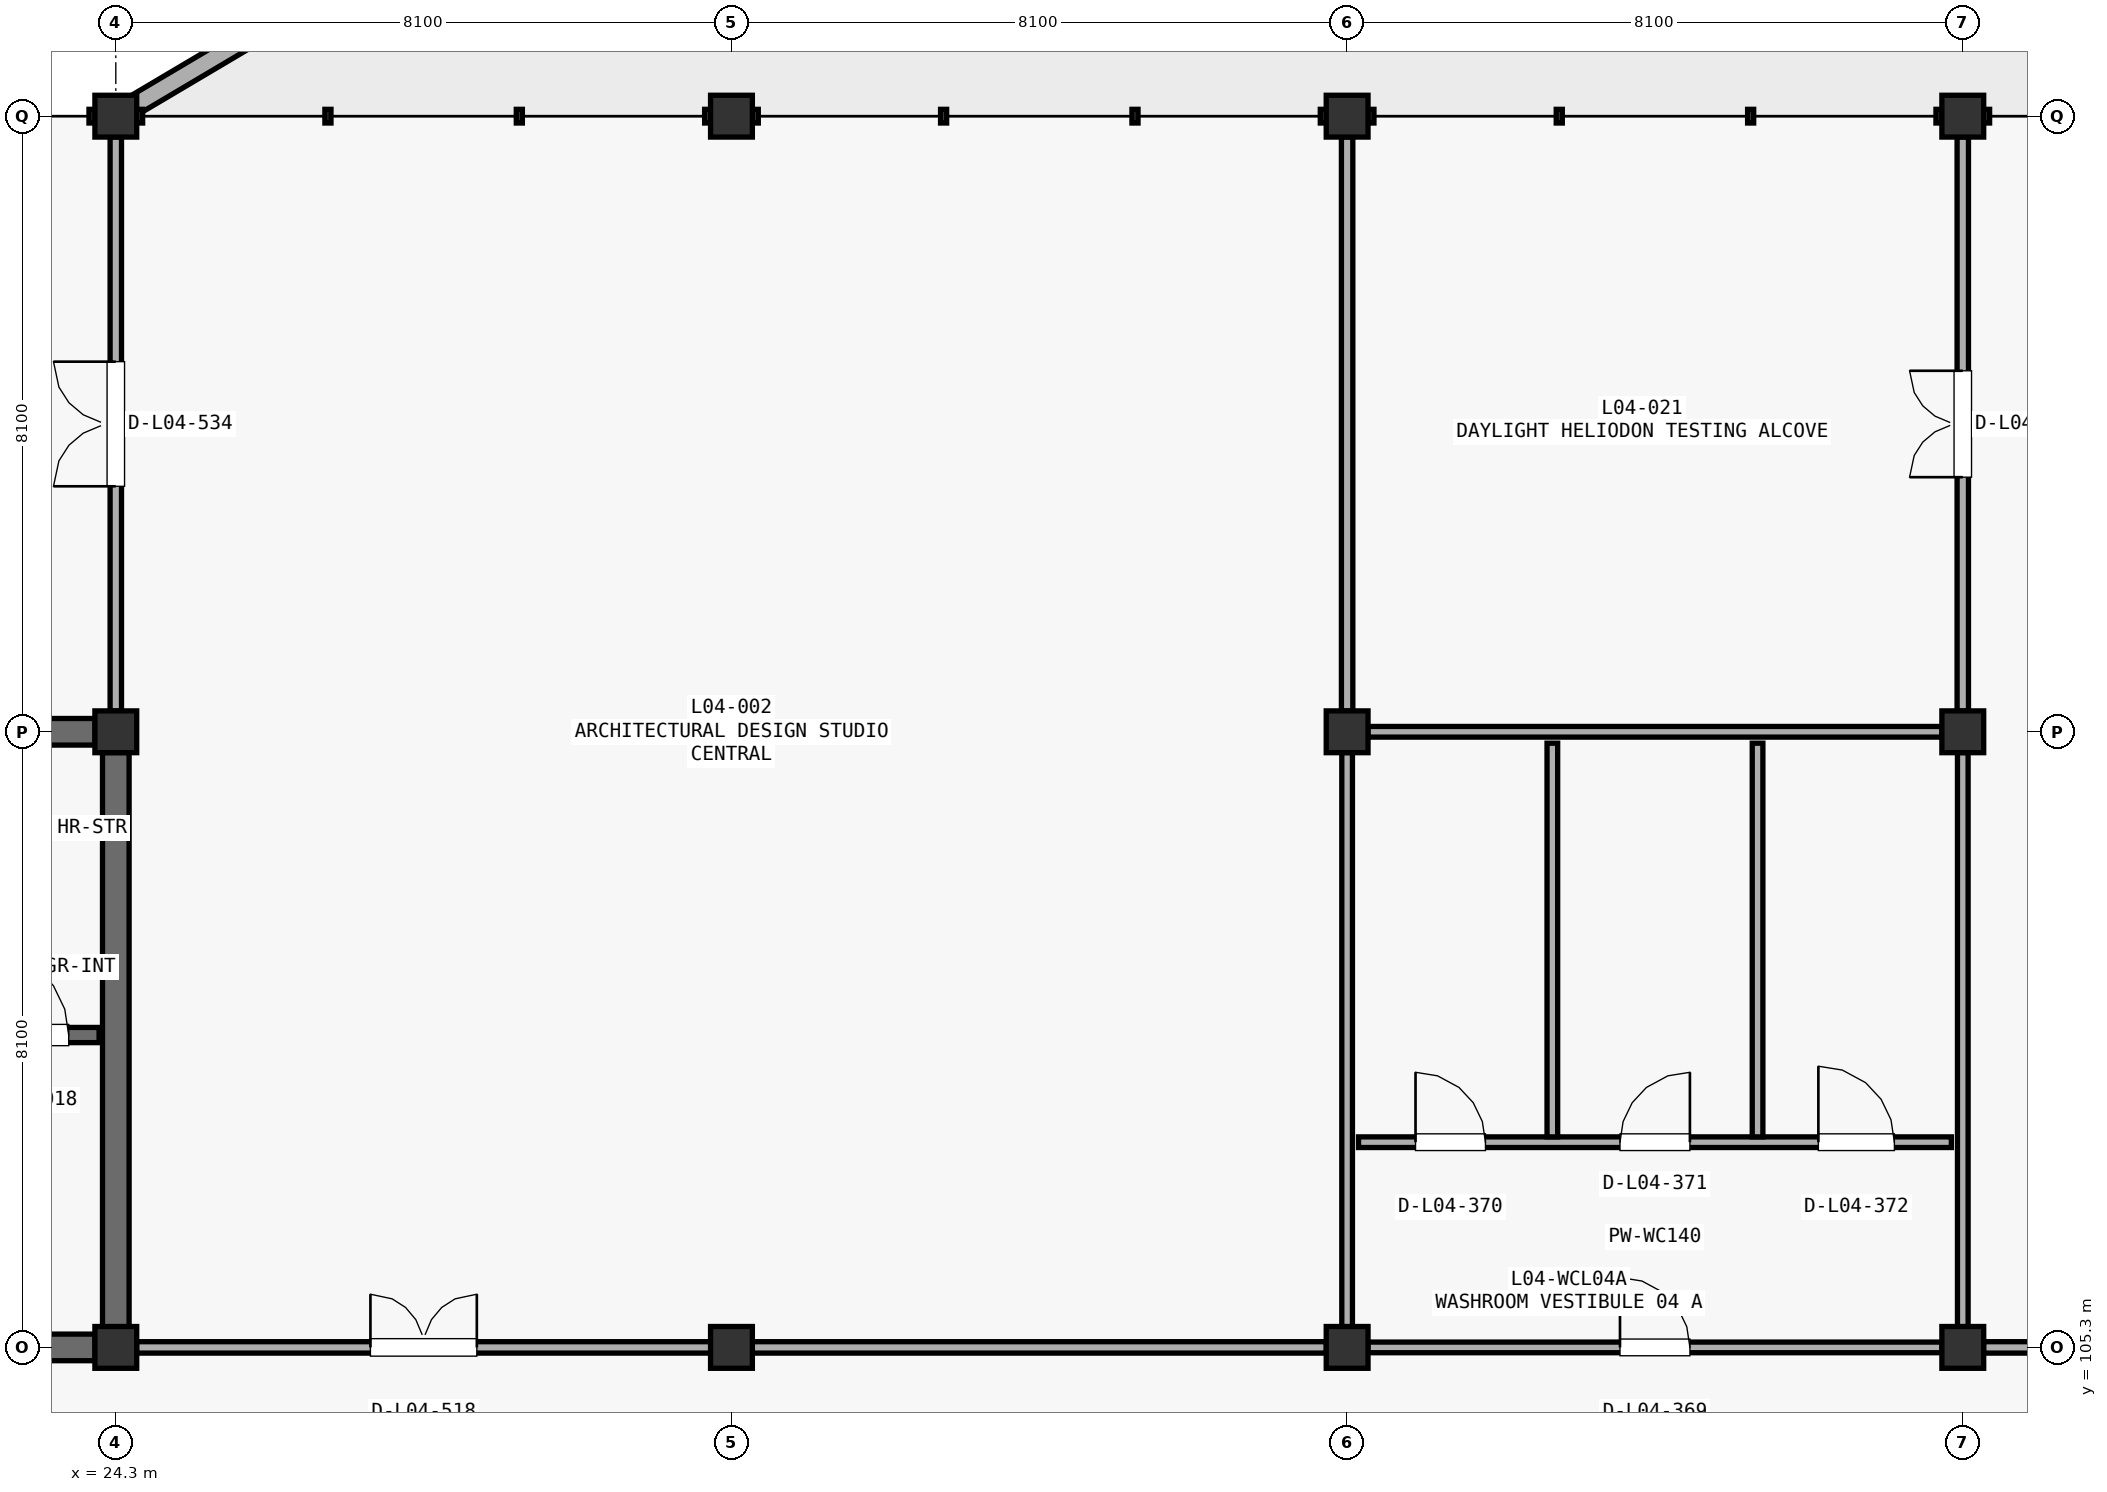
"""IFC4 building model, lengths in metres.
Left out: names, types, materials, properties, quantities, classifications, styles, units other than length and angle.
Written with IfcOpenShell. Run it as: python <this file> out.ifc"""

import sys

from ifc_helpers import new_model, si_unit, direction, frame, frame_2d, origin, origin_2d, place, context, subcontext, project, spatial, polyline, rectangle, outline, extrude, element, fill, save


model = new_model("IFC4")
c1 = context("Model", 3, precision=1e-05, world=origin(), true_north=direction((0.0, 1.0)))
c2 = subcontext(c1, "Body", "Model", "MODEL_VIEW")
j1 = project(units=[si_unit("LENGTHUNIT", "METRE"), si_unit("PLANEANGLEUNIT", "RADIAN")], contexts=[c1])
p1 = place(None, origin())
s1 = spatial("IfcSite", under=j1, at=p1, CompositionType="ELEMENT")
p2 = place(p1, origin())
s2 = spatial("IfcBuilding", under=s1, at=p2, CompositionType="ELEMENT")
p3 = place(p2, frame((0.0, 0.0, 18.53)))
s3 = spatial("IfcBuildingStorey", under=s2, at=p3, CompositionType="ELEMENT", Elevation=18.53)
for number, where, z_axis, x_axis in (
    (1, (24.3, 105.3, 0.0), (0.0, 0.0, 1.0), (1.0, 0.0, 0.0)),
    (2, (24.3, 113.4, 0.0), (0.0, 0.0, 1.0), (1.0, 0.0, 0.0)),
    (3, (24.3, 121.5, 0.0), (0.0, 0.0, 1.0), (1.0, 0.0, 0.0)),
    (4, (32.4, 105.3, 0.0), (0.0, 0.0, 1.0), (1.0, 0.0, 0.0)),
    (5, (32.4, 113.4, 0.0), (0.0, 0.0, 1.0), (1.0, 0.0, 0.0)),
    (6, (32.4, 121.5, 0.0), (0.0, 0.0, 1.0), (1.0, 0.0, 0.0)),
    (7, (40.5, 105.3, 0.0), (0.0, 0.0, 1.0), (1.0, 0.0, 0.0)),
    (8, (40.5, 113.4, 0.0), (0.0, 0.0, 1.0), (1.0, 0.0, 0.0)),
    (9, (40.5, 121.5, 0.0), (0.0, 0.0, 1.0), (1.0, 0.0, 0.0)),
    (10, (48.6, 105.3, 0.0), (0.0, 0.0, 1.0), (1.0, 0.0, 0.0)),
    (11, (48.6, 113.4, 0.0), (0.0, 0.0, 1.0), (1.0, 0.0, 0.0)),
    (12, (48.6, 121.5, 0.0), (0.0, 0.0, 1.0), (1.0, 0.0, 0.0)),
):
    element("IfcColumn", number, at=place(p3, frame(where, z_axis=z_axis, x_axis=x_axis)), inside=s3, PredefinedType="COLUMN", context=c2, shape_type="SweptSolid", body=[
        extrude(rectangle(XDim=0.55, YDim=0.55, at=origin_2d()), origin(), (0.0, 0.0, 1.0), 4.42),
    ])
p4 = place(p3, frame((24.317, 121.51, -0.35), z_axis=(0.0, 0.0, 1.0), x_axis=(0.860297032473, 0.509793110897, 0.0)))
e13 = element("IfcWall", 13, at=p4, inside=s3, PredefinedType="STANDARD", context=c2, shape_type="SweptSolid", body=[
    extrude(outline(polyline([(0.0, 0.0), (9.375, 0.0), (9.375, 2.46), (0.0, 0.36), (0.0, 0.0)])), frame((0.0, 0.13, 0.0), z_axis=(0.0, -1.0, 0.0), x_axis=(1.0, 0.0, 0.0)), (0.0, 0.0, 1.0), 0.26),
])
p5 = place(p3, frame((48.618, 125.591, -0.35), z_axis=(0.0, 0.0, 1.0), x_axis=(0.892206758846, -0.451627168657, 0.0)))
e14 = element("IfcWall", 14, at=p5, inside=s3, PredefinedType="STANDARD", context=c2, shape_type="SweptSolid", body=[
    extrude(outline(polyline([(0.0, 0.0), (9.039, 0.0), (9.039, 0.36), (0.0, 2.154), (0.0, 0.0)])), frame((0.0, 0.13, 0.0), z_axis=(0.0, -1.0, 0.0), x_axis=(1.0, 0.0, 0.0)), (0.0, 0.0, 1.0), 0.26),
])
p6 = place(p3, frame((16.473, 113.4, 0.0), z_axis=(0.0, 0.0, 1.0), x_axis=(1.0, 0.0, 0.0)))
e15 = element("IfcWall", 15, at=p6, inside=s3, PredefinedType="SHEAR", context=c2, shape_type="SweptSolid", body=[
    extrude(rectangle(XDim=7.554, YDim=0.35, at=frame_2d((3.777, 0.0))), origin(), (0.0, 0.0, 1.0), 4.162),
])
p7 = place(p3, frame((24.3, 105.573, 0.0), z_axis=(0.0, 0.0, 1.0), x_axis=(0.0, 1.0, 0.0)))
e16 = element("IfcWall", 16, at=p7, inside=s3, PredefinedType="SHEAR", context=c2, shape_type="SweptSolid", body=[
    extrude(rectangle(XDim=7.554, YDim=0.35, at=frame_2d((3.777, 0.0))), origin(), (0.0, 0.0, 1.0), 4.162),
])
p8 = place(p3, frame((16.473, 105.3, 0.0), z_axis=(0.0, 0.0, 1.0), x_axis=(1.0, 0.0, 0.0)))
e17 = element("IfcWall", 17, at=p8, inside=s3, PredefinedType="SHEAR", context=c2, shape_type="SweptSolid", body=[
    extrude(rectangle(XDim=7.554, YDim=0.35, at=frame_2d((3.777, 0.0))), origin(), (0.0, 0.0, 1.0), 4.162),
])
p9 = place(p8, frame((5.304, 0.0, 0.0)))
e18 = element("IfcOpeningElement", 18, at=p9, cuts=e17, PredefinedType="OPENING", context=c2, shape_type="SweptSolid", body=[
    extrude(rectangle(XDim=1.2, YDim=2.2, at=frame_2d((0.6, 1.1))), frame((0.0, 0.185, 0.0), z_axis=(0.0, -1.0, 0.0), x_axis=(1.0, 0.0, 0.0)), (0.0, 0.0, 1.0), 0.37),
])
p10 = place(p3, frame((16.42, 109.41, 0.0), z_axis=(0.0, 0.0, 1.0), x_axis=(1.0, 0.0, 0.0)))
e19 = element("IfcWall", 19, at=p10, inside=s3, PredefinedType="SHEAR", context=c2, shape_type="SweptSolid", body=[
    extrude(rectangle(XDim=7.66, YDim=0.2, at=frame_2d((3.83, 0.0))), origin(), (0.0, 0.0, 1.0), 4.162),
])
p11 = place(p10, frame((6.11, 0.0, 0.0)))
e20 = element("IfcOpeningElement", 20, at=p11, cuts=e19, PredefinedType="OPENING", context=c2, shape_type="SweptSolid", body=[
    extrude(rectangle(XDim=1.15, YDim=2.2, at=frame_2d((0.575, 1.1))), frame((0.0, 0.11, 0.0), z_axis=(0.0, -1.0, 0.0), x_axis=(1.0, 0.0, 0.0)), (0.0, 0.0, 1.0), 0.22),
])
p12 = place(p3, frame((40.773, 105.3, 0.0), z_axis=(0.0, 0.0, 1.0), x_axis=(1.0, 0.0, 0.0)))
e21 = element("IfcWall", 21, at=p12, inside=s3, PredefinedType="PARTITIONING", context=c2, shape_type="SweptSolid", body=[
    extrude(rectangle(XDim=7.554, YDim=0.14, at=frame_2d((3.777, 0.0))), origin(), (0.0, 0.0, 1.0), 3.31),
])
p13 = place(p12, frame((3.317, 0.0, 0.0)))
e22 = element("IfcOpeningElement", 22, at=p13, cuts=e21, PredefinedType="OPENING", context=c2, shape_type="SweptSolid", body=[
    extrude(rectangle(XDim=0.92, YDim=2.15, at=frame_2d((0.46, 1.075))), frame((0.0, 0.08, 0.0), z_axis=(0.0, -1.0, 0.0), x_axis=(1.0, 0.0, 0.0)), (0.0, 0.0, 1.0), 0.16),
])
p14 = place(p3, frame((40.773, 113.4, 0.0), z_axis=(0.0, 0.0, 1.0), x_axis=(1.0, 0.0, 0.0)))
e23 = element("IfcWall", 23, at=p14, inside=s3, PredefinedType="PARTITIONING", context=c2, shape_type="SweptSolid", body=[
    extrude(rectangle(XDim=7.554, YDim=0.14, at=frame_2d((3.777, 0.0))), origin(), (0.0, 0.0, 1.0), 3.21),
])
p15 = place(p3, frame((40.5, 105.573, 0.0), z_axis=(0.0, 0.0, 1.0), x_axis=(0.0, 1.0, 0.0)))
e24 = element("IfcWall", 24, at=p15, inside=s3, PredefinedType="PARTITIONING", context=c2, shape_type="SweptSolid", body=[
    extrude(rectangle(XDim=7.554, YDim=0.14, at=frame_2d((3.777, 0.0))), origin(), (0.0, 0.0, 1.0), 3.31),
])
p16 = place(p3, frame((48.6, 105.573, 0.0), z_axis=(0.0, 0.0, 1.0), x_axis=(0.0, 1.0, 0.0)))
e25 = element("IfcWall", 25, at=p16, inside=s3, PredefinedType="PARTITIONING", context=c2, shape_type="SweptSolid", body=[
    extrude(rectangle(XDim=7.554, YDim=0.14, at=frame_2d((3.777, 0.0))), origin(), (0.0, 0.0, 1.0), 3.41),
])
p17 = place(p3, frame((40.65, 108.0, 0.0), z_axis=(0.0, 0.0, 1.0), x_axis=(1.0, 0.0, 0.0)))
e26 = element("IfcWall", 26, at=p17, inside=s3, PredefinedType="PARTITIONING", context=c2, shape_type="SweptSolid", body=[
    extrude(rectangle(XDim=7.8, YDim=0.14, at=frame_2d((3.9, 0.0))), origin(), (0.0, 0.0, 1.0), 4.162),
])
p18 = place(p17, frame((0.75, 0.0, 0.0)))
e27 = element("IfcOpeningElement", 27, at=p18, cuts=e26, PredefinedType="OPENING", context=c2, shape_type="SweptSolid", body=[
    extrude(rectangle(XDim=0.92, YDim=2.15, at=frame_2d((0.46, 1.075))), frame((0.0, 0.08, 0.0), z_axis=(0.0, -1.0, 0.0), x_axis=(1.0, 0.0, 0.0)), (0.0, 0.0, 1.0), 0.16),
])
p19 = place(p17, frame((3.44, 0.0, 0.0)))
e28 = element("IfcOpeningElement", 28, at=p19, cuts=e26, PredefinedType="OPENING", context=c2, shape_type="SweptSolid", body=[
    extrude(rectangle(XDim=0.92, YDim=2.15, at=frame_2d((0.46, 1.075))), frame((0.0, 0.08, 0.0), z_axis=(0.0, -1.0, 0.0), x_axis=(1.0, 0.0, 0.0)), (0.0, 0.0, 1.0), 0.16),
])
p20 = place(p17, frame((6.05, 0.0, 0.0)))
e29 = element("IfcOpeningElement", 29, at=p20, cuts=e26, PredefinedType="OPENING", context=c2, shape_type="SweptSolid", body=[
    extrude(rectangle(XDim=1.0, YDim=2.15, at=frame_2d((0.5, 1.075))), frame((0.0, 0.08, 0.0), z_axis=(0.0, -1.0, 0.0), x_axis=(1.0, 0.0, 0.0)), (0.0, 0.0, 1.0), 0.16),
])
for number, where, z_axis, x_axis in (
    (30, (43.2, 108.07, 0.0), (0.0, 0.0, 1.0), (0.0, 1.0, 0.0)),
    (31, (45.9, 108.07, 0.0), (0.0, 0.0, 1.0), (0.0, 1.0, 0.0)),
):
    element("IfcWall", number, at=place(p3, frame(where, z_axis=z_axis, x_axis=x_axis)), inside=s3, PredefinedType="PARTITIONING", context=c2, shape_type="SweptSolid", body=[
        extrude(rectangle(XDim=5.18, YDim=0.14, at=frame_2d((2.59, 0.0))), origin(), (0.0, 0.0, 1.0), 4.162),
    ])
p21 = place(p3, frame((24.573, 105.3, 0.0), z_axis=(0.0, 0.0, 1.0), x_axis=(1.0, 0.0, 0.0)))
e32 = element("IfcWall", 32, at=p21, inside=s3, PredefinedType="PARTITIONING", context=c2, shape_type="SweptSolid", body=[
    extrude(rectangle(XDim=7.554, YDim=0.15, at=frame_2d((3.777, 0.0))), origin(), (0.0, 0.0, 1.0), 3.512),
])
p22 = place(p21, frame((3.077, 0.0, 0.0)))
e33 = element("IfcOpeningElement", 33, at=p22, cuts=e32, PredefinedType="OPENING", context=c2, shape_type="SweptSolid", body=[
    extrude(rectangle(XDim=1.4, YDim=2.2, at=frame_2d((0.7, 1.1))), frame((0.0, 0.085, 0.0), z_axis=(0.0, -1.0, 0.0), x_axis=(1.0, 0.0, 0.0)), (0.0, 0.0, 1.0), 0.17),
])
p23 = place(p3, frame((32.673, 105.3, 0.0), z_axis=(0.0, 0.0, 1.0), x_axis=(1.0, 0.0, 0.0)))
e34 = element("IfcWall", 34, at=p23, inside=s3, PredefinedType="PARTITIONING", context=c2, shape_type="SweptSolid", body=[
    extrude(rectangle(XDim=7.554, YDim=0.15, at=frame_2d((3.777, 0.0))), origin(), (0.0, 0.0, 1.0), 3.562),
])
p24 = place(p3, frame((40.5, 113.673, 0.0), z_axis=(0.0, 0.0, 1.0), x_axis=(0.0, 1.0, 0.0)))
e35 = element("IfcWall", 35, at=p24, inside=s3, PredefinedType="PARTITIONING", context=c2, shape_type="SweptSolid", body=[
    extrude(rectangle(XDim=7.554, YDim=0.15, at=frame_2d((3.777, 0.0))), origin(), (0.0, 0.0, 1.0), 3.212),
])
p25 = place(p3, frame((24.3, 113.673, 0.0), z_axis=(0.0, 0.0, 1.0), x_axis=(0.0, 1.0, 0.0)))
e36 = element("IfcWall", 36, at=p25, inside=s3, PredefinedType="PARTITIONING", context=c2, shape_type="SweptSolid", body=[
    extrude(rectangle(XDim=7.554, YDim=0.15, at=frame_2d((3.777, 0.0))), origin(), (0.0, 0.0, 1.0), 3.412),
])
p26 = place(p25, frame((2.957, 0.0, 0.0)))
e37 = element("IfcOpeningElement", 37, at=p26, cuts=e36, PredefinedType="OPENING", context=c2, shape_type="SweptSolid", body=[
    extrude(rectangle(XDim=1.64, YDim=2.25, at=frame_2d((0.82, 1.125))), frame((0.0, 0.085, 0.0), z_axis=(0.0, -1.0, 0.0), x_axis=(1.0, 0.0, 0.0)), (0.0, 0.0, 1.0), 0.17),
])
p27 = place(p3, frame((48.873, 105.3, 0.0), z_axis=(0.0, 0.0, 1.0), x_axis=(1.0, 0.0, 0.0)))
e38 = element("IfcWall", 38, at=p27, inside=s3, PredefinedType="PARTITIONING", context=c2, shape_type="SweptSolid", body=[
    extrude(rectangle(XDim=7.554, YDim=0.15, at=frame_2d((3.777, 0.0))), origin(), (0.0, 0.0, 1.0), 3.212),
])
p28 = place(p27, frame((2.957, 0.0, 0.0)))
e39 = element("IfcOpeningElement", 39, at=p28, cuts=e38, PredefinedType="OPENING", context=c2, shape_type="SweptSolid", body=[
    extrude(rectangle(XDim=1.64, YDim=2.25, at=frame_2d((0.82, 1.125))), frame((0.0, 0.085, 0.0), z_axis=(0.0, -1.0, 0.0), x_axis=(1.0, 0.0, 0.0)), (0.0, 0.0, 1.0), 0.17),
])
p29 = place(p3, frame((48.6, 113.673, 0.0), z_axis=(0.0, 0.0, 1.0), x_axis=(0.0, 1.0, 0.0)))
e40 = element("IfcWall", 40, at=p29, inside=s3, PredefinedType="PARTITIONING", context=c2, shape_type="SweptSolid", body=[
    extrude(rectangle(XDim=7.554, YDim=0.15, at=frame_2d((3.777, 0.0))), origin(), (0.0, 0.0, 1.0), 3.512),
])
p30 = place(p29, frame((3.077, 0.0, 0.0)))
e41 = element("IfcOpeningElement", 41, at=p30, cuts=e40, PredefinedType="OPENING", context=c2, shape_type="SweptSolid", body=[
    extrude(rectangle(XDim=1.4, YDim=2.2, at=frame_2d((0.7, 1.1))), frame((0.0, 0.085, 0.0), z_axis=(0.0, -1.0, 0.0), x_axis=(1.0, 0.0, 0.0)), (0.0, 0.0, 1.0), 0.17),
])
p31 = place(p11, origin())
e42 = element("IfcDoor", 42, at=p31, inside=s3, OperationType="SINGLE_SWING_LEFT", PredefinedType="DOOR", context=c2, shape_type="SweptSolid", body=[
    extrude(rectangle(XDim=1.15, YDim=2.2, at=frame_2d((0.575, 1.1))), frame((0.0, 0.025, 0.0), z_axis=(0.0, -1.0, 0.0), x_axis=(1.0, 0.0, 0.0)), (0.0, 0.0, 1.0), 0.05),
])
fill(e20, e42)
p32 = place(p13, origin())
e43 = element("IfcDoor", 43, at=p32, inside=s3, OperationType="SINGLE_SWING_LEFT", PredefinedType="DOOR", context=c2, shape_type="SweptSolid", body=[
    extrude(rectangle(XDim=0.92, YDim=2.15, at=frame_2d((0.46, 1.075))), frame((0.0, 0.025, 0.0), z_axis=(0.0, -1.0, 0.0), x_axis=(1.0, 0.0, 0.0)), (0.0, 0.0, 1.0), 0.05),
])
fill(e22, e43)
p33 = place(p18, origin())
e44 = element("IfcDoor", 44, at=p33, inside=s3, OperationType="SINGLE_SWING_LEFT", PredefinedType="DOOR", context=c2, shape_type="SweptSolid", body=[
    extrude(rectangle(XDim=0.92, YDim=2.15, at=frame_2d((0.46, 1.075))), frame((0.0, 0.025, 0.0), z_axis=(0.0, -1.0, 0.0), x_axis=(1.0, 0.0, 0.0)), (0.0, 0.0, 1.0), 0.05),
])
fill(e27, e44)
p34 = place(p19, origin())
e45 = element("IfcDoor", 45, at=p34, inside=s3, OperationType="SINGLE_SWING_RIGHT", PredefinedType="DOOR", context=c2, shape_type="SweptSolid", body=[
    extrude(rectangle(XDim=0.92, YDim=2.15, at=frame_2d((0.46, 1.075))), frame((0.0, 0.025, 0.0), z_axis=(0.0, -1.0, 0.0), x_axis=(1.0, 0.0, 0.0)), (0.0, 0.0, 1.0), 0.05),
])
fill(e28, e45)
p35 = place(p20, origin())
e46 = element("IfcDoor", 46, at=p35, inside=s3, OperationType="SINGLE_SWING_LEFT", PredefinedType="DOOR", context=c2, shape_type="SweptSolid", body=[
    extrude(rectangle(XDim=1.0, YDim=2.15, at=frame_2d((0.5, 1.075))), frame((0.0, 0.025, 0.0), z_axis=(0.0, -1.0, 0.0), x_axis=(1.0, 0.0, 0.0)), (0.0, 0.0, 1.0), 0.05),
])
fill(e29, e46)
p36 = place(p22, origin())
e47 = element("IfcDoor", 47, at=p36, inside=s3, OperationType="DOUBLE_SWING_LEFT", PredefinedType="DOOR", context=c2, shape_type="SweptSolid", body=[
    extrude(rectangle(XDim=1.4, YDim=2.2, at=frame_2d((0.7, 1.1))), frame((0.0, 0.025, 0.0), z_axis=(0.0, -1.0, 0.0), x_axis=(1.0, 0.0, 0.0)), (0.0, 0.0, 1.0), 0.05),
])
fill(e33, e47)
p37 = place(p26, origin())
e48 = element("IfcDoor", 48, at=p37, inside=s3, OperationType="DOUBLE_SWING_LEFT", PredefinedType="DOOR", context=c2, shape_type="SweptSolid", body=[
    extrude(rectangle(XDim=1.64, YDim=2.25, at=frame_2d((0.82, 1.125))), frame((0.0, 0.025, 0.0), z_axis=(0.0, -1.0, 0.0), x_axis=(1.0, 0.0, 0.0)), (0.0, 0.0, 1.0), 0.05),
])
fill(e37, e48)
p38 = place(p30, origin())
e49 = element("IfcDoor", 49, at=p38, inside=s3, OperationType="DOUBLE_SWING_LEFT", PredefinedType="DOOR", context=c2, shape_type="SweptSolid", body=[
    extrude(rectangle(XDim=1.4, YDim=2.2, at=frame_2d((0.7, 1.1))), frame((0.0, 0.025, 0.0), z_axis=(0.0, -1.0, 0.0), x_axis=(1.0, 0.0, 0.0)), (0.0, 0.0, 1.0), 0.05),
])
fill(e41, e49)
save(model, sys.argv[1])
